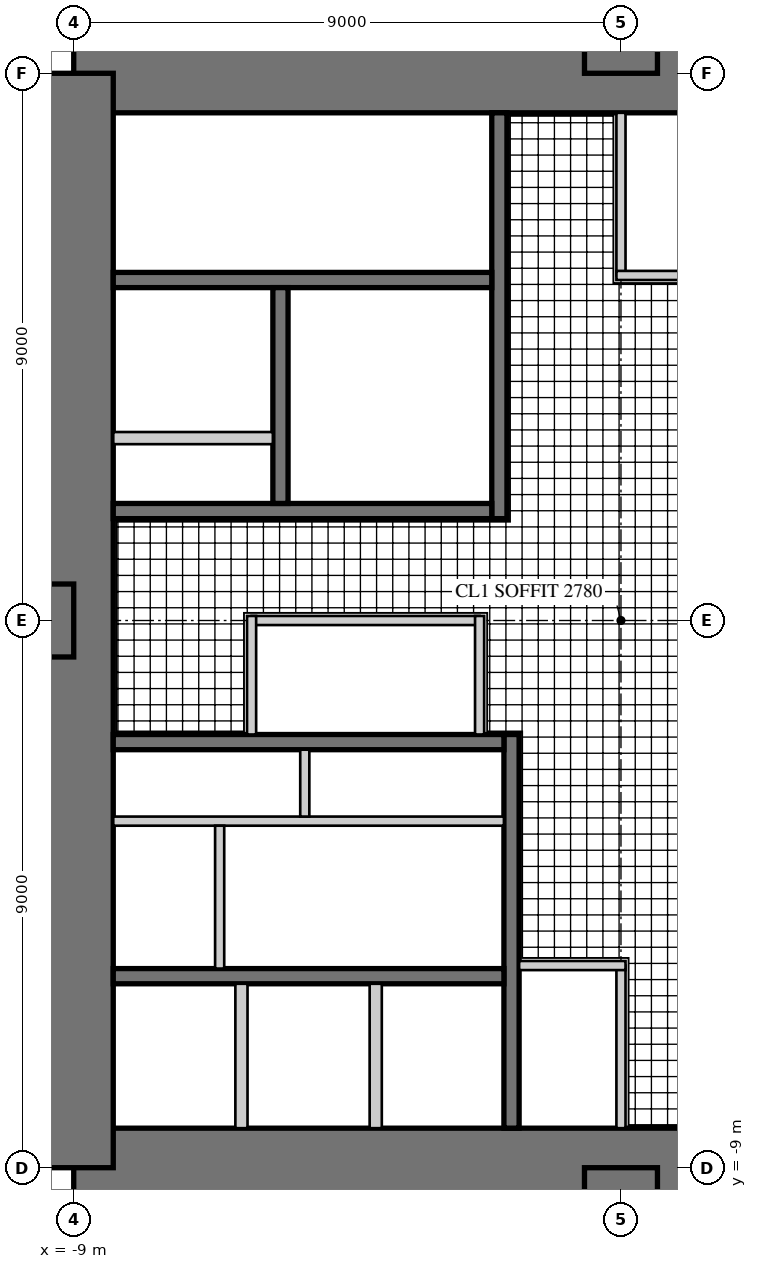
"""IFC4 building model, lengths in metres.
Left out: names, types, materials, properties, quantities, classifications, styles, units other than length and angle.
Written with IfcOpenShell. Run it as: python <this file> out.ifc"""

import sys

from ifc_helpers import new_model, si_unit, direction, frame, frame_2d, origin, place, context, subcontext, project, spatial, rectangle, extrude, element, fill, save


model = new_model("IFC4")
c1 = context("Model", 3, precision=1e-05, world=origin(), true_north=direction((0.0, 1.0)))
c2 = subcontext(c1, "Body", "Model", "MODEL_VIEW")
j1 = project(units=[si_unit("LENGTHUNIT", "METRE"), si_unit("PLANEANGLEUNIT", "RADIAN")], contexts=[c1])
p1 = place(None, origin())
s1 = spatial("IfcSite", under=j1, at=p1, CompositionType="ELEMENT")
p2 = place(p1, origin())
s2 = spatial("IfcBuilding", under=s1, at=p2, CompositionType="ELEMENT")
p3 = place(p2, frame((0.0, 0.0, 136.5)))
s3 = spatial("IfcBuildingStorey", under=s2, at=p3, CompositionType="ELEMENT", Elevation=136.5)
p4 = place(p3, frame((9.0, 9.0, 0.0), z_axis=(0.0, 0.0, 1.0), x_axis=(-1.0, 0.0, 0.0)))
e1 = element("IfcWall", 1, at=p4, inside=s3, PredefinedType="SHEAR", context=c2, shape_type="SweptSolid", body=[
    extrude(rectangle(XDim=18.0, YDim=1.3, at=frame_2d((9.0, 0.0))), origin(), (0.0, 0.0, 1.0), 4.0),
])
p5 = place(p4, frame((9.8, 0.0, 0.0)))
e2 = element("IfcOpeningElement", 2, at=p5, cuts=e1, PredefinedType="OPENING", context=c2, shape_type="SweptSolid", body=[
    extrude(rectangle(XDim=1.0, YDim=2.4, at=frame_2d((0.5, 1.2))), frame((0.0, 0.66, 0.0), z_axis=(0.0, -1.0, 0.0), x_axis=(1.0, 0.0, 0.0)), (0.0, 0.0, 1.0), 1.32),
])
p6 = place(p3, frame((-9.0, -9.0, 0.0), z_axis=(0.0, 0.0, 1.0), x_axis=(1.0, 0.0, 0.0)))
e3 = element("IfcWall", 3, at=p6, inside=s3, PredefinedType="SHEAR", context=c2, shape_type="SweptSolid", body=[
    extrude(rectangle(XDim=18.0, YDim=1.3, at=frame_2d((9.0, 0.0))), origin(), (0.0, 0.0, 1.0), 4.0),
])
p7 = place(p6, frame((9.8, 0.0, 0.0)))
e4 = element("IfcOpeningElement", 4, at=p7, cuts=e3, PredefinedType="OPENING", context=c2, shape_type="SweptSolid", body=[
    extrude(rectangle(XDim=1.0, YDim=2.4, at=frame_2d((0.5, 1.2))), frame((0.0, 0.66, 0.0), z_axis=(0.0, -1.0, 0.0), x_axis=(1.0, 0.0, 0.0)), (0.0, 0.0, 1.0), 1.32),
])
p8 = place(p3, frame((-9.0, 9.0, 0.0), z_axis=(0.0, 0.0, 1.0), x_axis=(0.0, -1.0, 0.0)))
e5 = element("IfcWall", 5, at=p8, inside=s3, PredefinedType="SHEAR", context=c2, shape_type="SweptSolid", body=[
    extrude(rectangle(XDim=18.0, YDim=1.3, at=frame_2d((9.0, 0.0))), origin(), (0.0, 0.0, 1.0), 4.0),
])
p9 = place(p8, frame((9.8, 0.0, 0.0)))
e6 = element("IfcOpeningElement", 6, at=p9, cuts=e5, PredefinedType="OPENING", context=c2, shape_type="SweptSolid", body=[
    extrude(rectangle(XDim=1.0, YDim=2.4, at=frame_2d((0.5, 1.2))), frame((0.0, 0.66, 0.0), z_axis=(0.0, -1.0, 0.0), x_axis=(1.0, 0.0, 0.0)), (0.0, 0.0, 1.0), 1.32),
])
p10 = place(p3, frame((-2.0, 1.675, 0.0), z_axis=(0.0, 0.0, 1.0), x_axis=(0.0, 1.0, 0.0)))
e7 = element("IfcWall", 7, at=p10, inside=s3, PredefinedType="SHEAR", context=c2, shape_type="SweptSolid", body=[
    extrude(rectangle(XDim=6.675, YDim=0.25, at=frame_2d((3.337, 0.0))), origin(), (0.0, 0.0, 1.0), 4.0),
])
p11 = place(p10, frame((0.725, 0.0, 0.0)))
e8 = element("IfcOpeningElement", 8, at=p11, cuts=e7, PredefinedType="OPENING", context=c2, shape_type="SweptSolid", body=[
    extrude(rectangle(XDim=1.0, YDim=2.1, at=frame_2d((0.5, 1.05))), frame((0.0, 0.135, 0.0), z_axis=(0.0, -1.0, 0.0), x_axis=(1.0, 0.0, 0.0)), (0.0, 0.0, 1.0), 0.27),
])
p12 = place(p3, frame((-2.125, 1.8, 0.0), z_axis=(0.0, 0.0, 1.0), x_axis=(-1.0, 0.0, 0.0)))
e9 = element("IfcWall", 9, at=p12, inside=s3, PredefinedType="SHEAR", context=c2, shape_type="SweptSolid", body=[
    extrude(rectangle(XDim=6.225, YDim=0.25, at=frame_2d((3.113, 0.0))), origin(), (0.0, 0.0, 1.0), 4.0),
])
p13 = place(p3, frame((-2.125, 5.6, 0.0), z_axis=(0.0, 0.0, 1.0), x_axis=(-1.0, 0.0, 0.0)))
e10 = element("IfcWall", 10, at=p13, inside=s3, PredefinedType="SHEAR", context=c2, shape_type="SweptSolid", body=[
    extrude(rectangle(XDim=6.225, YDim=0.25, at=frame_2d((3.113, 0.0))), origin(), (0.0, 0.0, 1.0), 4.0),
])
p14 = place(p13, frame((0.175, 0.0, 0.0)))
e11 = element("IfcOpeningElement", 11, at=p14, cuts=e10, PredefinedType="OPENING", context=c2, shape_type="SweptSolid", body=[
    extrude(rectangle(XDim=1.0, YDim=2.1, at=frame_2d((0.5, 1.05))), frame((0.0, 0.135, 0.0), z_axis=(0.0, -1.0, 0.0), x_axis=(1.0, 0.0, 0.0)), (0.0, 0.0, 1.0), 0.27),
])
p15 = place(p3, frame((-5.6, 1.925, 0.0), z_axis=(0.0, 0.0, 1.0), x_axis=(0.0, 1.0, 0.0)))
e12 = element("IfcWall", 12, at=p15, inside=s3, PredefinedType="SHEAR", context=c2, shape_type="SweptSolid", body=[
    extrude(rectangle(XDim=3.55, YDim=0.25, at=frame_2d((1.775, 0.0))), origin(), (0.0, 0.0, 1.0), 4.0),
])
p16 = place(p15, frame((1.525, 0.0, 0.0)))
e13 = element("IfcOpeningElement", 13, at=p16, cuts=e12, PredefinedType="OPENING", context=c2, shape_type="SweptSolid", body=[
    extrude(rectangle(XDim=1.1, YDim=2.2, at=frame_2d((0.55, 1.1))), frame((0.0, 0.135, 0.0), z_axis=(0.0, -1.0, 0.0), x_axis=(1.0, 0.0, 0.0)), (0.0, 0.0, 1.0), 0.27),
])
p17 = place(p15, frame((0.075, 0.0, 0.0)))
e14 = element("IfcOpeningElement", 14, at=p17, cuts=e12, PredefinedType="OPENING", context=c2, shape_type="SweptSolid", body=[
    extrude(rectangle(XDim=0.8, YDim=2.1, at=frame_2d((0.4, 1.05))), frame((0.0, 0.135, 0.0), z_axis=(0.0, -1.0, 0.0), x_axis=(1.0, 0.0, 0.0)), (0.0, 0.0, 1.0), 0.27),
])
p18 = place(p3, frame((-5.725, 3.0, 0.0), z_axis=(0.0, 0.0, 1.0), x_axis=(-1.0, 0.0, 0.0)))
e15 = element("IfcWall", 15, at=p18, inside=s3, PredefinedType="PARTITIONING", context=c2, shape_type="SweptSolid", body=[
    extrude(rectangle(XDim=2.625, YDim=0.2, at=frame_2d((1.312, 0.0))), origin(), (0.0, 0.0, 1.0), 4.0),
])
p19 = place(p3, frame((-1.8, -1.875, 0.0), z_axis=(0.0, 0.0, 1.0), x_axis=(0.0, -1.0, 0.0)))
e16 = element("IfcWall", 16, at=p19, inside=s3, PredefinedType="SHEAR", context=c2, shape_type="SweptSolid", body=[
    extrude(rectangle(XDim=6.475, YDim=0.25, at=frame_2d((3.238, 0.0))), origin(), (0.0, 0.0, 1.0), 4.0),
])
p20 = place(p19, frame((1.875, 0.0, 0.0)))
e17 = element("IfcOpeningElement", 17, at=p20, cuts=e16, PredefinedType="OPENING", context=c2, shape_type="SweptSolid", body=[
    extrude(rectangle(XDim=1.6, YDim=2.4, at=frame_2d((0.8, 1.2))), frame((0.0, 0.135, 0.0), z_axis=(0.0, -1.0, 0.0), x_axis=(1.0, 0.0, 0.0)), (0.0, 0.0, 1.0), 0.27),
])
for number, where, z_axis, x_axis in (
    (18, (-1.925, -2.0, 0.0), (0.0, 0.0, 1.0), (-1.0, 0.0, 0.0)),
    (19, (-1.925, -5.85, 0.0), (0.0, 0.0, 1.0), (-1.0, 0.0, 0.0)),
):
    element("IfcWall", number, at=place(p3, frame(where, z_axis=z_axis, x_axis=x_axis)), inside=s3, PredefinedType="SHEAR", context=c2, shape_type="SweptSolid", body=[
        extrude(rectangle(XDim=6.425, YDim=0.25, at=frame_2d((3.212, 0.0))), origin(), (0.0, 0.0, 1.0), 4.0),
    ])
p21 = place(p3, frame((-1.925, -3.3, 0.0), z_axis=(0.0, 0.0, 1.0), x_axis=(-1.0, 0.0, 0.0)))
e20 = element("IfcWall", 20, at=p21, inside=s3, PredefinedType="PARTITIONING", context=c2, shape_type="SweptSolid", body=[
    extrude(rectangle(XDim=6.425, YDim=0.15, at=frame_2d((3.212, 0.0))), origin(), (0.0, 0.0, 1.0), 4.0),
])
p22 = place(p21, frame((0.075, 0.0, 0.0)))
e21 = element("IfcOpeningElement", 21, at=p22, cuts=e20, PredefinedType="OPENING", context=c2, shape_type="SweptSolid", body=[
    extrude(rectangle(XDim=0.8, YDim=2.1, at=frame_2d((0.4, 1.05))), frame((0.0, 0.085, 0.0), z_axis=(0.0, -1.0, 0.0), x_axis=(1.0, 0.0, 0.0)), (0.0, 0.0, 1.0), 0.17),
])
p23 = place(p21, frame((3.675, 0.0, 0.0)))
e22 = element("IfcOpeningElement", 22, at=p23, cuts=e20, PredefinedType="OPENING", context=c2, shape_type="SweptSolid", body=[
    extrude(rectangle(XDim=0.8, YDim=2.1, at=frame_2d((0.4, 1.05))), frame((0.0, 0.085, 0.0), z_axis=(0.0, -1.0, 0.0), x_axis=(1.0, 0.0, 0.0)), (0.0, 0.0, 1.0), 0.17),
])
p24 = place(p3, frame((-5.2, -2.125, 0.0), z_axis=(0.0, 0.0, 1.0), x_axis=(0.0, -1.0, 0.0)))
e23 = element("IfcWall", 23, at=p24, inside=s3, PredefinedType="PARTITIONING", context=c2, shape_type="SweptSolid", body=[
    extrude(rectangle(XDim=1.1, YDim=0.15, at=frame_2d((0.55, 0.0))), origin(), (0.0, 0.0, 1.0), 4.0),
])
for number, where, z_axis, x_axis in (
    (24, (-4.033, -5.975, 0.0), (0.0, 0.0, 1.0), (0.0, -1.0, 0.0)),
    (25, (-6.242, -5.975, 0.0), (0.0, 0.0, 1.0), (0.0, -1.0, 0.0)),
):
    element("IfcWall", number, at=place(p3, frame(where, z_axis=z_axis, x_axis=x_axis)), inside=s3, PredefinedType="PARTITIONING", context=c2, shape_type="SweptSolid", body=[
        extrude(rectangle(XDim=2.375, YDim=0.2, at=frame_2d((1.188, 0.0))), origin(), (0.0, 0.0, 1.0), 4.0),
    ])
p25 = place(p3, frame((0.0, 9.0, 0.0), z_axis=(0.0, 0.0, 1.0), x_axis=(0.0, 1.0, 0.0)))
e26 = element("IfcWall", 26, at=p25, inside=s3, PredefinedType="SHEAR", context=c2, shape_type="SweptSolid", body=[
    extrude(rectangle(XDim=9.0, YDim=1.2, at=frame_2d((4.5, 0.0))), origin(), (0.0, 0.0, 1.0), 4.0),
])
p26 = place(p25, frame((4.3, 0.0, 0.0)))
e27 = element("IfcOpeningElement", 27, at=p26, cuts=e26, PredefinedType="OPENING", context=c2, shape_type="SweptSolid", body=[
    extrude(rectangle(XDim=1.0, YDim=2.2, at=frame_2d((0.5, 1.1))), frame((0.0, 0.61, 0.0), z_axis=(0.0, -1.0, 0.0), x_axis=(1.0, 0.0, 0.0)), (0.0, 0.0, 1.0), 1.22),
])
p27 = place(p3, frame((0.0, -9.0, 0.0), z_axis=(0.0, 0.0, 1.0), x_axis=(0.0, -1.0, 0.0)))
e28 = element("IfcWall", 28, at=p27, inside=s3, PredefinedType="SHEAR", context=c2, shape_type="SweptSolid", body=[
    extrude(rectangle(XDim=18.0, YDim=1.2, at=frame_2d((9.0, 0.0))), origin(), (0.0, 0.0, 1.0), 4.0),
])
p28 = place(p27, frame((9.8, 0.0, 0.0)))
e29 = element("IfcOpeningElement", 29, at=p28, cuts=e28, PredefinedType="OPENING", context=c2, shape_type="SweptSolid", body=[
    extrude(rectangle(XDim=1.0, YDim=2.2, at=frame_2d((0.5, 1.1))), frame((0.0, 0.61, 0.0), z_axis=(0.0, -1.0, 0.0), x_axis=(1.0, 0.0, 0.0)), (0.0, 0.0, 1.0), 1.22),
])
p29 = place(p3, frame((-9.0, 0.0, 0.0), z_axis=(0.0, 0.0, 1.0), x_axis=(-1.0, 0.0, 0.0)))
e30 = element("IfcWall", 30, at=p29, inside=s3, PredefinedType="SHEAR", context=c2, shape_type="SweptSolid", body=[
    extrude(rectangle(XDim=18.0, YDim=1.2, at=frame_2d((9.0, 0.0))), origin(), (0.0, 0.0, 1.0), 4.0),
])
p30 = place(p29, frame((9.8, 0.0, 0.0)))
e31 = element("IfcOpeningElement", 31, at=p30, cuts=e30, PredefinedType="OPENING", context=c2, shape_type="SweptSolid", body=[
    extrude(rectangle(XDim=1.0, YDim=2.2, at=frame_2d((0.5, 1.1))), frame((0.0, 0.61, 0.0), z_axis=(0.0, -1.0, 0.0), x_axis=(1.0, 0.0, 0.0)), (0.0, 0.0, 1.0), 1.22),
])
p31 = place(p3, frame((-2.325, 0.0, 0.0), z_axis=(0.0, 0.0, 1.0), x_axis=(-1.0, 0.0, 0.0)))
e32 = element("IfcWall", 32, at=p31, inside=s3, PredefinedType="PARTITIONING", context=c2, shape_type="SweptSolid", body=[
    extrude(rectangle(XDim=3.75, YDim=0.15, at=frame_2d((1.875, 0.0))), origin(), (0.0, 0.0, 1.0), 3.8),
])
p32 = place(p31, frame((0.4, 0.0, 0.0)))
e33 = element("IfcOpeningElement", 33, at=p32, cuts=e32, PredefinedType="OPENING", context=c2, shape_type="SweptSolid", body=[
    extrude(rectangle(XDim=1.0, YDim=2.1, at=frame_2d((0.5, 1.05))), frame((0.0, 0.085, 0.0), z_axis=(0.0, -1.0, 0.0), x_axis=(1.0, 0.0, 0.0)), (0.0, 0.0, 1.0), 0.17),
])
for number, where, z_axis, x_axis in (
    (34, (-2.325, -1.875, 0.0), (0.0, 0.0, 1.0), (0.0, 1.0, 0.0)),
    (35, (-6.075, 0.075, 0.0), (0.0, 0.0, 1.0), (0.0, -1.0, 0.0)),
):
    element("IfcWall", number, at=place(p3, frame(where, z_axis=z_axis, x_axis=x_axis)), inside=s3, PredefinedType="PARTITIONING", context=c2, shape_type="SweptSolid", body=[
        extrude(rectangle(XDim=1.95, YDim=0.15, at=frame_2d((0.975, 0.0))), origin(), (0.0, 0.0, 1.0), 3.8),
    ])
p33 = place(p3, frame((0.0, 5.675, 0.0), z_axis=(0.0, 0.0, 1.0), x_axis=(0.0, 1.0, 0.0)))
e36 = element("IfcWall", 36, at=p33, inside=s3, PredefinedType="PARTITIONING", context=c2, shape_type="SweptSolid", body=[
    extrude(rectangle(XDim=2.675, YDim=0.15, at=frame_2d((1.337, 0.0))), origin(), (0.0, 0.0, 1.0), 3.8),
])
p34 = place(p33, frame((0.4, 0.0, 0.0)))
e37 = element("IfcOpeningElement", 37, at=p34, cuts=e36, PredefinedType="OPENING", context=c2, shape_type="SweptSolid", body=[
    extrude(rectangle(XDim=1.0, YDim=2.1, at=frame_2d((0.5, 1.05))), frame((0.0, 0.085, 0.0), z_axis=(0.0, -1.0, 0.0), x_axis=(1.0, 0.0, 0.0)), (0.0, 0.0, 1.0), 0.17),
])
p35 = place(p3, frame((1.675, 5.675, 0.0), z_axis=(0.0, 0.0, 1.0), x_axis=(-1.0, 0.0, 0.0)))
e38 = element("IfcWall", 38, at=p35, inside=s3, PredefinedType="PARTITIONING", context=c2, shape_type="SweptSolid", body=[
    extrude(rectangle(XDim=1.75, YDim=0.15, at=frame_2d((0.875, 0.0))), origin(), (0.0, 0.0, 1.0), 3.8),
])
p36 = place(p3, frame((0.0, -5.675, 0.0), z_axis=(0.0, 0.0, 1.0), x_axis=(0.0, -1.0, 0.0)))
e39 = element("IfcWall", 39, at=p36, inside=s3, PredefinedType="PARTITIONING", context=c2, shape_type="SweptSolid", body=[
    extrude(rectangle(XDim=2.675, YDim=0.15, at=frame_2d((1.337, 0.0))), origin(), (0.0, 0.0, 1.0), 3.8),
])
p37 = place(p36, frame((0.4, 0.0, 0.0)))
e40 = element("IfcOpeningElement", 40, at=p37, cuts=e39, PredefinedType="OPENING", context=c2, shape_type="SweptSolid", body=[
    extrude(rectangle(XDim=1.0, YDim=2.1, at=frame_2d((0.5, 1.05))), frame((0.0, 0.085, 0.0), z_axis=(0.0, -1.0, 0.0), x_axis=(1.0, 0.0, 0.0)), (0.0, 0.0, 1.0), 0.17),
])
p38 = place(p3, frame((-1.675, -5.675, 0.0), z_axis=(0.0, 0.0, 1.0), x_axis=(1.0, 0.0, 0.0)))
e41 = element("IfcWall", 41, at=p38, inside=s3, PredefinedType="PARTITIONING", context=c2, shape_type="SweptSolid", body=[
    extrude(rectangle(XDim=1.75, YDim=0.15, at=frame_2d((0.875, 0.0))), origin(), (0.0, 0.0, 1.0), 3.8),
])
p39 = place(p3, frame((-6.6, -3.375, 0.0), z_axis=(0.0, 0.0, 1.0), x_axis=(0.0, -1.0, 0.0)))
e42 = element("IfcWall", 42, at=p39, inside=s3, PredefinedType="PARTITIONING", context=c2, shape_type="SweptSolid", body=[
    extrude(rectangle(XDim=2.35, YDim=0.15, at=frame_2d((1.175, 0.0))), origin(), (0.0, 0.0, 1.0), 3.8),
])
p40 = place(p39, frame((0.45, 0.0, 0.0)))
e43 = element("IfcOpeningElement", 43, at=p40, cuts=e42, PredefinedType="OPENING", context=c2, shape_type="SweptSolid", body=[
    extrude(rectangle(XDim=1.0, YDim=2.1, at=frame_2d((0.5, 1.05))), frame((0.0, 0.085, 0.0), z_axis=(0.0, -1.0, 0.0), x_axis=(1.0, 0.0, 0.0)), (0.0, 0.0, 1.0), 0.17),
])
p41 = place(p32, origin())
e44 = element("IfcDoor", 44, at=p41, inside=s3, OperationType="SINGLE_SWING_LEFT", PredefinedType="DOOR", context=c2, shape_type="SweptSolid", body=[
    extrude(rectangle(XDim=1.0, YDim=2.1, at=frame_2d((0.5, 1.05))), frame((0.0, 0.025, 0.0), z_axis=(0.0, -1.0, 0.0), x_axis=(1.0, 0.0, 0.0)), (0.0, 0.0, 1.0), 0.05),
])
fill(e33, e44)
p42 = place(p34, frame((1.0, 0.0, 0.0), z_axis=(0.0, 0.0, 1.0), x_axis=(-1.0, 0.0, 0.0)))
e45 = element("IfcDoor", 45, at=p42, inside=s3, OperationType="SINGLE_SWING_RIGHT", PredefinedType="DOOR", context=c2, shape_type="SweptSolid", body=[
    extrude(rectangle(XDim=1.0, YDim=2.1, at=frame_2d((0.5, 1.05))), frame((0.0, 0.025, 0.0), z_axis=(0.0, -1.0, 0.0), x_axis=(1.0, 0.0, 0.0)), (0.0, 0.0, 1.0), 0.05),
])
fill(e37, e45)
p43 = place(p37, frame((1.0, 0.0, 0.0), z_axis=(0.0, 0.0, 1.0), x_axis=(-1.0, 0.0, 0.0)))
e46 = element("IfcDoor", 46, at=p43, inside=s3, OperationType="SINGLE_SWING_RIGHT", PredefinedType="DOOR", context=c2, shape_type="SweptSolid", body=[
    extrude(rectangle(XDim=1.0, YDim=2.1, at=frame_2d((0.5, 1.05))), frame((0.0, 0.025, 0.0), z_axis=(0.0, -1.0, 0.0), x_axis=(1.0, 0.0, 0.0)), (0.0, 0.0, 1.0), 0.05),
])
fill(e40, e46)
p44 = place(p40, frame((1.0, 0.0, 0.0), z_axis=(0.0, 0.0, 1.0), x_axis=(-1.0, 0.0, 0.0)))
e47 = element("IfcDoor", 47, at=p44, inside=s3, OperationType="SINGLE_SWING_RIGHT", PredefinedType="DOOR", context=c2, shape_type="SweptSolid", body=[
    extrude(rectangle(XDim=1.0, YDim=2.1, at=frame_2d((0.5, 1.05))), frame((0.0, 0.025, 0.0), z_axis=(0.0, -1.0, 0.0), x_axis=(1.0, 0.0, 0.0)), (0.0, 0.0, 1.0), 0.05),
])
fill(e43, e47)
p45 = place(p5, frame((1.0, 0.0, 0.0), z_axis=(0.0, 0.0, 1.0), x_axis=(-1.0, 0.0, 0.0)))
e48 = element("IfcDoor", 48, at=p45, inside=s3, OperationType="SINGLE_SWING_RIGHT", PredefinedType="DOOR", context=c2, shape_type="SweptSolid", body=[
    extrude(rectangle(XDim=1.0, YDim=2.4, at=frame_2d((0.5, 1.2))), frame((0.0, -0.005, 0.0), z_axis=(0.0, -1.0, 0.0), x_axis=(1.0, 0.0, 0.0)), (0.0, 0.0, 1.0), 0.05),
])
fill(e2, e48)
p46 = place(p7, frame((1.0, 0.0, 0.0), z_axis=(0.0, 0.0, 1.0), x_axis=(-1.0, 0.0, 0.0)))
e49 = element("IfcDoor", 49, at=p46, inside=s3, OperationType="SINGLE_SWING_RIGHT", PredefinedType="DOOR", context=c2, shape_type="SweptSolid", body=[
    extrude(rectangle(XDim=1.0, YDim=2.4, at=frame_2d((0.5, 1.2))), frame((0.0, -0.005, 0.0), z_axis=(0.0, -1.0, 0.0), x_axis=(1.0, 0.0, 0.0)), (0.0, 0.0, 1.0), 0.05),
])
fill(e4, e49)
p47 = place(p9, frame((1.0, 0.0, 0.0), z_axis=(0.0, 0.0, 1.0), x_axis=(-1.0, 0.0, 0.0)))
e50 = element("IfcDoor", 50, at=p47, inside=s3, OperationType="SINGLE_SWING_RIGHT", PredefinedType="DOOR", context=c2, shape_type="SweptSolid", body=[
    extrude(rectangle(XDim=1.0, YDim=2.4, at=frame_2d((0.5, 1.2))), frame((0.0, -0.005, 0.0), z_axis=(0.0, -1.0, 0.0), x_axis=(1.0, 0.0, 0.0)), (0.0, 0.0, 1.0), 0.05),
])
fill(e6, e50)
p48 = place(p11, origin())
e51 = element("IfcDoor", 51, at=p48, inside=s3, OperationType="SINGLE_SWING_LEFT", PredefinedType="DOOR", context=c2, shape_type="SweptSolid", body=[
    extrude(rectangle(XDim=1.0, YDim=2.1, at=frame_2d((0.5, 1.05))), frame((0.0, 0.025, 0.0), z_axis=(0.0, -1.0, 0.0), x_axis=(1.0, 0.0, 0.0)), (0.0, 0.0, 1.0), 0.05),
])
fill(e8, e51)
p49 = place(p14, frame((1.0, 0.0, 0.0), z_axis=(0.0, 0.0, 1.0), x_axis=(-1.0, 0.0, 0.0)))
e52 = element("IfcDoor", 52, at=p49, inside=s3, OperationType="SINGLE_SWING_RIGHT", PredefinedType="DOOR", context=c2, shape_type="SweptSolid", body=[
    extrude(rectangle(XDim=1.0, YDim=2.1, at=frame_2d((0.5, 1.05))), frame((0.0, 0.025, 0.0), z_axis=(0.0, -1.0, 0.0), x_axis=(1.0, 0.0, 0.0)), (0.0, 0.0, 1.0), 0.05),
])
fill(e11, e52)
p50 = place(p16, origin())
e53 = element("IfcDoor", 53, at=p50, inside=s3, OperationType="DOUBLE_DOOR_SLIDING", PredefinedType="DOOR", context=c2, shape_type="SweptSolid", body=[
    extrude(rectangle(XDim=1.1, YDim=2.2, at=frame_2d((0.55, 1.1))), frame((0.0, 0.025, 0.0), z_axis=(0.0, -1.0, 0.0), x_axis=(1.0, 0.0, 0.0)), (0.0, 0.0, 1.0), 0.05),
])
fill(e13, e53)
p51 = place(p17, origin())
e54 = element("IfcDoor", 54, at=p51, inside=s3, OperationType="SINGLE_SWING_LEFT", PredefinedType="DOOR", context=c2, shape_type="SweptSolid", body=[
    extrude(rectangle(XDim=0.8, YDim=2.1, at=frame_2d((0.4, 1.05))), frame((0.0, 0.025, 0.0), z_axis=(0.0, -1.0, 0.0), x_axis=(1.0, 0.0, 0.0)), (0.0, 0.0, 1.0), 0.05),
])
fill(e14, e54)
p52 = place(p20, frame((1.6, 0.0, 0.0), z_axis=(0.0, 0.0, 1.0), x_axis=(-1.0, 0.0, 0.0)))
e55 = element("IfcDoor", 55, at=p52, inside=s3, OperationType="DOUBLE_DOOR_SINGLE_SWING", PredefinedType="DOOR", context=c2, shape_type="SweptSolid", body=[
    extrude(rectangle(XDim=1.6, YDim=2.4, at=frame_2d((0.8, 1.2))), frame((0.0, 0.025, 0.0), z_axis=(0.0, -1.0, 0.0), x_axis=(1.0, 0.0, 0.0)), (0.0, 0.0, 1.0), 0.05),
])
fill(e17, e55)
p53 = place(p22, frame((0.8, 0.0, 0.0), z_axis=(0.0, 0.0, 1.0), x_axis=(-1.0, 0.0, 0.0)))
e56 = element("IfcDoor", 56, at=p53, inside=s3, OperationType="SINGLE_SWING_RIGHT", PredefinedType="DOOR", context=c2, shape_type="SweptSolid", body=[
    extrude(rectangle(XDim=0.8, YDim=2.1, at=frame_2d((0.4, 1.05))), frame((0.0, 0.025, 0.0), z_axis=(0.0, -1.0, 0.0), x_axis=(1.0, 0.0, 0.0)), (0.0, 0.0, 1.0), 0.05),
])
fill(e21, e56)
p54 = place(p23, frame((0.8, 0.0, 0.0), z_axis=(0.0, 0.0, 1.0), x_axis=(-1.0, 0.0, 0.0)))
e57 = element("IfcDoor", 57, at=p54, inside=s3, OperationType="SINGLE_SWING_RIGHT", PredefinedType="DOOR", context=c2, shape_type="SweptSolid", body=[
    extrude(rectangle(XDim=0.8, YDim=2.1, at=frame_2d((0.4, 1.05))), frame((0.0, 0.025, 0.0), z_axis=(0.0, -1.0, 0.0), x_axis=(1.0, 0.0, 0.0)), (0.0, 0.0, 1.0), 0.05),
])
fill(e22, e57)
save(model, sys.argv[1])
